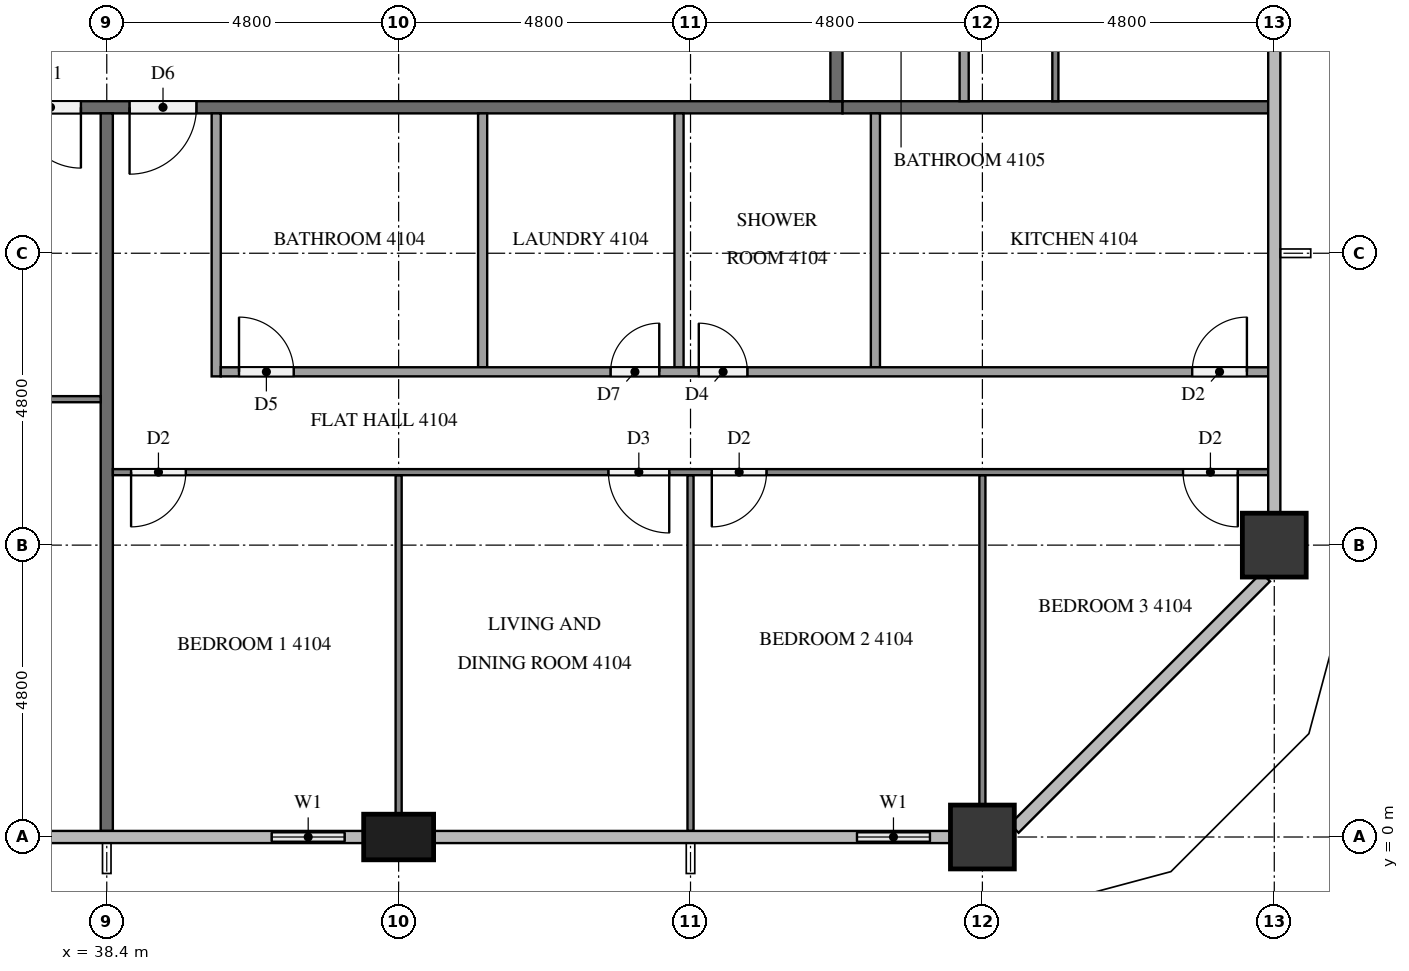
"""IFC4 building model, lengths in metres.
Left out: names, types, materials, properties, quantities, classifications, styles, units other than length and angle.
Written with IfcOpenShell. Run it as: python <this file> out.ifc"""

import sys

from ifc_helpers import new_model, si_unit, direction, frame, frame_2d, origin, origin_2d, place, context, subcontext, project, spatial, rectangle, extrude, element, fill, save


model = new_model("IFC4")
c1 = context("Model", 3, precision=1e-05, world=origin(), true_north=direction((0.0, 1.0)))
c2 = subcontext(c1, "Body", "Model", "MODEL_VIEW")
j1 = project(units=[si_unit("LENGTHUNIT", "METRE"), si_unit("PLANEANGLEUNIT", "RADIAN")], contexts=[c1])
p1 = place(None, origin())
s1 = spatial("IfcSite", under=j1, at=p1, CompositionType="ELEMENT")
p2 = place(p1, origin())
s2 = spatial("IfcBuilding", under=s1, at=p2, CompositionType="ELEMENT")
p3 = place(p2, frame((0.0, 0.0, 159.5)))
s3 = spatial("IfcBuildingStorey", under=s2, at=p3, CompositionType="ELEMENT", Elevation=159.5)
p4 = place(p3, frame((43.2, 0.0, 0.0), z_axis=(0.0, 0.0, 1.0), x_axis=(1.0, 0.0, 0.0)))
e1 = element("IfcColumn", 1, at=p4, inside=s3, PredefinedType="COLUMN", context=c2, shape_type="SweptSolid", body=[
    extrude(rectangle(XDim=1.15, YDim=0.75, at=origin_2d()), origin(), (0.0, 0.0, 1.0), 3.2),
])
for number, where, z_axis, x_axis in (
    (2, (52.8, 0.0, 0.0), (0.0, 0.0, 1.0), (1.0, 0.0, 0.0)),
    (3, (57.6, 4.8, 0.0), (0.0, 0.0, 1.0), (1.0, 0.0, 0.0)),
):
    element("IfcColumn", number, at=place(p3, frame(where, z_axis=z_axis, x_axis=x_axis)), inside=s3, PredefinedType="COLUMN", context=c2, shape_type="SweptSolid", body=[
        extrude(rectangle(XDim=1.05, YDim=1.05, at=origin_2d()), origin(), (0.0, 0.0, 1.0), 3.2),
    ])
p5 = place(p3, frame((40.8, 0.0, 0.0), z_axis=(0.0, 0.0, 1.0), x_axis=(1.0, 0.0, 0.0)))
e4 = element("IfcWall", 4, at=p5, inside=s3, PredefinedType="SOLIDWALL", context=c2, shape_type="SweptSolid", body=[
    extrude(rectangle(XDim=1.825, YDim=0.15, at=frame_2d((0.913, 0.0))), origin(), (0.0, 0.0, 1.0), 3.2),
])
p6 = place(p5, frame((0.312, 0.0, 0.9)))
e5 = element("IfcOpeningElement", 5, at=p6, cuts=e4, PredefinedType="OPENING", context=c2, shape_type="SweptSolid", body=[
    extrude(rectangle(XDim=1.2, YDim=1.4, at=frame_2d((0.6, 0.7))), frame((0.0, 0.085, 0.0), z_axis=(0.0, -1.0, 0.0), x_axis=(1.0, 0.0, 0.0)), (0.0, 0.0, 1.0), 0.17),
])
p7 = place(p3, frame((50.4, 0.0, 0.0), z_axis=(0.0, 0.0, 1.0), x_axis=(1.0, 0.0, 0.0)))
e6 = element("IfcWall", 6, at=p7, inside=s3, PredefinedType="SOLIDWALL", context=c2, shape_type="SweptSolid", body=[
    extrude(rectangle(XDim=1.875, YDim=0.15, at=frame_2d((0.938, 0.0))), origin(), (0.0, 0.0, 1.0), 3.2),
])
p8 = place(p7, frame((0.337, 0.0, 0.9)))
e7 = element("IfcOpeningElement", 7, at=p8, cuts=e6, PredefinedType="OPENING", context=c2, shape_type="SweptSolid", body=[
    extrude(rectangle(XDim=1.2, YDim=1.4, at=frame_2d((0.6, 0.7))), frame((0.0, 0.085, 0.0), z_axis=(0.0, -1.0, 0.0), x_axis=(1.0, 0.0, 0.0)), (0.0, 0.0, 1.0), 0.17),
])
p9 = place(p3, frame((50.5, 12.0, 0.0), z_axis=(0.0, 0.0, 1.0), x_axis=(-1.0, 0.0, 0.0)))
e8 = element("IfcWall", 8, at=p9, inside=s3, PredefinedType="PARTITIONING", context=c2, shape_type="SweptSolid", body=[
    extrude(rectangle(XDim=38.6, YDim=0.2, at=frame_2d((19.3, 0.0))), origin(), (0.0, 0.0, 1.0), 3.2),
])
p10 = place(p9, frame((34.125, 0.0, 0.0)))
e9 = element("IfcOpeningElement", 9, at=p10, cuts=e8, PredefinedType="OPENING", context=c2, shape_type="SweptSolid", body=[
    extrude(rectangle(XDim=1.0, YDim=2.1, at=frame_2d((0.5, 1.05))), frame((0.0, 0.11, 0.0), z_axis=(0.0, -1.0, 0.0), x_axis=(1.0, 0.0, 0.0)), (0.0, 0.0, 1.0), 0.22),
])
p11 = place(p9, frame((32.275, 0.0, 0.0)))
e10 = element("IfcOpeningElement", 10, at=p11, cuts=e8, PredefinedType="OPENING", context=c2, shape_type="SweptSolid", body=[
    extrude(rectangle(XDim=1.0, YDim=2.1, at=frame_2d((0.5, 1.05))), frame((0.0, 0.11, 0.0), z_axis=(0.0, -1.0, 0.0), x_axis=(1.0, 0.0, 0.0)), (0.0, 0.0, 1.0), 0.22),
])
p12 = place(p9, frame((12.525, 0.0, 0.0)))
e11 = element("IfcOpeningElement", 11, at=p12, cuts=e8, PredefinedType="OPENING", context=c2, shape_type="SweptSolid", body=[
    extrude(rectangle(XDim=1.0, YDim=2.1, at=frame_2d((0.5, 1.05))), frame((0.0, 0.11, 0.0), z_axis=(0.0, -1.0, 0.0), x_axis=(1.0, 0.0, 0.0)), (0.0, 0.0, 1.0), 0.22),
])
p13 = place(p9, frame((10.625, 0.0, 0.0)))
e12 = element("IfcOpeningElement", 12, at=p13, cuts=e8, PredefinedType="OPENING", context=c2, shape_type="SweptSolid", body=[
    extrude(rectangle(XDim=1.1, YDim=2.1, at=frame_2d((0.55, 1.05))), frame((0.0, 0.11, 0.0), z_axis=(0.0, -1.0, 0.0), x_axis=(1.0, 0.0, 0.0)), (0.0, 0.0, 1.0), 0.22),
])
p14 = place(p3, frame((50.4, 40.7, 0.0), z_axis=(0.0, 0.0, 1.0), x_axis=(0.0, -1.0, 0.0)))
e13 = element("IfcWall", 13, at=p14, inside=s3, PredefinedType="PARTITIONING", context=c2, shape_type="SweptSolid", body=[
    extrude(rectangle(XDim=28.6, YDim=0.2, at=frame_2d((14.3, 0.0))), origin(), (0.0, 0.0, 1.0), 3.2),
])
p15 = place(p14, frame((19.525, 0.0, 0.0)))
e14 = element("IfcOpeningElement", 14, at=p15, cuts=e13, PredefinedType="OPENING", context=c2, shape_type="SweptSolid", body=[
    extrude(rectangle(XDim=1.0, YDim=2.1, at=frame_2d((0.5, 1.05))), frame((0.0, 0.11, 0.0), z_axis=(0.0, -1.0, 0.0), x_axis=(1.0, 0.0, 0.0)), (0.0, 0.0, 1.0), 0.22),
])
p16 = place(p14, frame((17.675, 0.0, 0.0)))
e15 = element("IfcOpeningElement", 15, at=p16, cuts=e13, PredefinedType="OPENING", context=c2, shape_type="SweptSolid", body=[
    extrude(rectangle(XDim=1.0, YDim=2.1, at=frame_2d((0.5, 1.05))), frame((0.0, 0.11, 0.0), z_axis=(0.0, -1.0, 0.0), x_axis=(1.0, 0.0, 0.0)), (0.0, 0.0, 1.0), 0.22),
])
p17 = place(p14, frame((8.075, 0.0, 0.0)))
e16 = element("IfcOpeningElement", 16, at=p17, cuts=e13, PredefinedType="OPENING", context=c2, shape_type="SweptSolid", body=[
    extrude(rectangle(XDim=1.0, YDim=2.1, at=frame_2d((0.5, 1.05))), frame((0.0, 0.11, 0.0), z_axis=(0.0, -1.0, 0.0), x_axis=(1.0, 0.0, 0.0)), (0.0, 0.0, 1.0), 0.22),
])
p18 = place(p3, frame((38.4, 11.9, 0.0), z_axis=(0.0, 0.0, 1.0), x_axis=(0.0, -1.0, 0.0)))
e17 = element("IfcWall", 17, at=p18, inside=s3, PredefinedType="PARTITIONING", context=c2, shape_type="SweptSolid", body=[
    extrude(rectangle(XDim=11.8, YDim=0.2, at=frame_2d((5.9, 0.0))), origin(), (0.0, 0.0, 1.0), 3.2),
])
p19 = place(p3, frame((50.5, 12.0, 0.0), z_axis=(0.0, 0.0, 1.0), x_axis=(1.0, 0.0, 0.0)))
e18 = element("IfcWall", 18, at=p19, inside=s3, PredefinedType="PARTITIONING", context=c2, shape_type="SweptSolid", body=[
    extrude(rectangle(XDim=7.0, YDim=0.2, at=frame_2d((3.5, 0.0))), origin(), (0.0, 0.0, 1.0), 3.2),
])
p20 = place(p3, frame((38.3, 7.2, 0.0), z_axis=(0.0, 0.0, 1.0), x_axis=(-1.0, 0.0, 0.0)))
e19 = element("IfcWall", 19, at=p20, inside=s3, PredefinedType="PARTITIONING", context=c2, shape_type="SweptSolid", body=[
    extrude(rectangle(XDim=14.2, YDim=0.1, at=frame_2d((7.1, 0.0))), origin(), (0.0, 0.0, 1.0), 3.2),
])
p21 = place(p20, frame((3.45, 0.0, 0.0)))
e20 = element("IfcOpeningElement", 20, at=p21, cuts=e19, PredefinedType="OPENING", context=c2, shape_type="SweptSolid", body=[
    extrude(rectangle(XDim=0.9, YDim=2.1, at=frame_2d((0.45, 1.05))), frame((0.0, 0.06, 0.0), z_axis=(0.0, -1.0, 0.0), x_axis=(1.0, 0.0, 0.0)), (0.0, 0.0, 1.0), 0.12),
])
p22 = place(p20, frame((5.05, 0.0, 0.0)))
e21 = element("IfcOpeningElement", 21, at=p22, cuts=e19, PredefinedType="OPENING", context=c2, shape_type="SweptSolid", body=[
    extrude(rectangle(XDim=0.9, YDim=2.1, at=frame_2d((0.45, 1.05))), frame((0.0, 0.06, 0.0), z_axis=(0.0, -1.0, 0.0), x_axis=(1.0, 0.0, 0.0)), (0.0, 0.0, 1.0), 0.12),
])
p23 = place(p20, frame((12.9, 0.0, 0.0)))
e22 = element("IfcOpeningElement", 22, at=p23, cuts=e19, PredefinedType="OPENING", context=c2, shape_type="SweptSolid", body=[
    extrude(rectangle(XDim=1.0, YDim=2.1, at=frame_2d((0.5, 1.05))), frame((0.0, 0.06, 0.0), z_axis=(0.0, -1.0, 0.0), x_axis=(1.0, 0.0, 0.0)), (0.0, 0.0, 1.0), 0.12),
])
p24 = place(p3, frame((43.2, 5.95, 0.0), z_axis=(0.0, 0.0, 1.0), x_axis=(0.0, -1.0, 0.0)))
e23 = element("IfcWall", 23, at=p24, inside=s3, PredefinedType="PARTITIONING", context=c2, shape_type="SweptSolid", body=[
    extrude(rectangle(XDim=5.575, YDim=0.1, at=frame_2d((2.788, 0.0))), origin(), (0.0, 0.0, 1.0), 3.2),
])
p25 = place(p3, frame((48.0, 5.95, 0.0), z_axis=(0.0, 0.0, 1.0), x_axis=(0.0, -1.0, 0.0)))
e24 = element("IfcWall", 24, at=p25, inside=s3, PredefinedType="PARTITIONING", context=c2, shape_type="SweptSolid", body=[
    extrude(rectangle(XDim=5.85, YDim=0.1, at=frame_2d((2.925, 0.0))), origin(), (0.0, 0.0, 1.0), 3.2),
])
p26 = place(p3, frame((52.8, 5.95, 0.0), z_axis=(0.0, 0.0, 1.0), x_axis=(0.0, -1.0, 0.0)))
e25 = element("IfcWall", 25, at=p26, inside=s3, PredefinedType="PARTITIONING", context=c2, shape_type="SweptSolid", body=[
    extrude(rectangle(XDim=5.425, YDim=0.1, at=frame_2d((2.712, 0.0))), origin(), (0.0, 0.0, 1.0), 3.2),
])
p27 = place(p3, frame((57.5, 6.0, 0.0), z_axis=(0.0, 0.0, 1.0), x_axis=(-1.0, 0.0, 0.0)))
e26 = element("IfcWall", 26, at=p27, inside=s3, PredefinedType="PARTITIONING", context=c2, shape_type="SweptSolid", body=[
    extrude(rectangle(XDim=19.0, YDim=0.1, at=frame_2d((9.5, 0.0))), origin(), (0.0, 0.0, 1.0), 3.2),
])
p28 = place(p27, frame((17.8, 0.0, 0.0)))
e27 = element("IfcOpeningElement", 27, at=p28, cuts=e26, PredefinedType="OPENING", context=c2, shape_type="SweptSolid", body=[
    extrude(rectangle(XDim=0.9, YDim=2.1, at=frame_2d((0.45, 1.05))), frame((0.0, 0.06, 0.0), z_axis=(0.0, -1.0, 0.0), x_axis=(1.0, 0.0, 0.0)), (0.0, 0.0, 1.0), 0.12),
])
p29 = place(p27, frame((9.85, 0.0, 0.0)))
e28 = element("IfcOpeningElement", 28, at=p29, cuts=e26, PredefinedType="OPENING", context=c2, shape_type="SweptSolid", body=[
    extrude(rectangle(XDim=1.0, YDim=2.1, at=frame_2d((0.5, 1.05))), frame((0.0, 0.06, 0.0), z_axis=(0.0, -1.0, 0.0), x_axis=(1.0, 0.0, 0.0)), (0.0, 0.0, 1.0), 0.12),
])
p30 = place(p27, frame((8.25, 0.0, 0.0)))
e29 = element("IfcOpeningElement", 29, at=p30, cuts=e26, PredefinedType="OPENING", context=c2, shape_type="SweptSolid", body=[
    extrude(rectangle(XDim=0.9, YDim=2.1, at=frame_2d((0.45, 1.05))), frame((0.0, 0.06, 0.0), z_axis=(0.0, -1.0, 0.0), x_axis=(1.0, 0.0, 0.0)), (0.0, 0.0, 1.0), 0.12),
])
p31 = place(p27, frame((0.5, 0.0, 0.0)))
e30 = element("IfcOpeningElement", 30, at=p31, cuts=e26, PredefinedType="OPENING", context=c2, shape_type="SweptSolid", body=[
    extrude(rectangle(XDim=0.9, YDim=2.1, at=frame_2d((0.45, 1.05))), frame((0.0, 0.06, 0.0), z_axis=(0.0, -1.0, 0.0), x_axis=(1.0, 0.0, 0.0)), (0.0, 0.0, 1.0), 0.12),
])
for number, where, z_axis, x_axis in (
    (31, (44.581, 11.9, 0.0), (0.0, 0.0, 1.0), (0.0, -1.0, 0.0)),
    (32, (47.811, 11.9, 0.0), (0.0, 0.0, 1.0), (0.0, -1.0, 0.0)),
    (33, (51.041, 11.9, 0.0), (0.0, 0.0, 1.0), (0.0, -1.0, 0.0)),
):
    element("IfcWall", number, at=place(p3, frame(where, z_axis=z_axis, x_axis=x_axis)), inside=s3, PredefinedType="PARTITIONING", context=c2, shape_type="SweptSolid", body=[
        extrude(rectangle(XDim=4.175, YDim=0.15, at=frame_2d((2.087, 0.0))), origin(), (0.0, 0.0, 1.0), 3.2),
    ])
p32 = place(p3, frame((40.2, 11.9, 0.0), z_axis=(0.0, 0.0, 1.0), x_axis=(0.0, -1.0, 0.0)))
e34 = element("IfcWall", 34, at=p32, inside=s3, PredefinedType="PARTITIONING", context=c2, shape_type="SweptSolid", body=[
    extrude(rectangle(XDim=4.325, YDim=0.15, at=frame_2d((2.163, 0.0))), origin(), (0.0, 0.0, 1.0), 3.2),
])
p33 = place(p3, frame((40.275, 7.65, 0.0), z_axis=(0.0, 0.0, 1.0), x_axis=(1.0, 0.0, 0.0)))
e35 = element("IfcWall", 35, at=p33, inside=s3, PredefinedType="PARTITIONING", context=c2, shape_type="SweptSolid", body=[
    extrude(rectangle(XDim=17.225, YDim=0.15, at=frame_2d((8.613, 0.0))), origin(), (0.0, 0.0, 1.0), 3.2),
])
p34 = place(p33, frame((0.3, 0.0, 0.0)))
e36 = element("IfcOpeningElement", 36, at=p34, cuts=e35, PredefinedType="OPENING", context=c2, shape_type="SweptSolid", body=[
    extrude(rectangle(XDim=0.9, YDim=2.1, at=frame_2d((0.45, 1.05))), frame((0.0, 0.085, 0.0), z_axis=(0.0, -1.0, 0.0), x_axis=(1.0, 0.0, 0.0)), (0.0, 0.0, 1.0), 0.17),
])
p35 = place(p33, frame((6.411, 0.0, 0.0)))
e37 = element("IfcOpeningElement", 37, at=p35, cuts=e35, PredefinedType="OPENING", context=c2, shape_type="SweptSolid", body=[
    extrude(rectangle(XDim=0.8, YDim=2.1, at=frame_2d((0.4, 1.05))), frame((0.0, 0.085, 0.0), z_axis=(0.0, -1.0, 0.0), x_axis=(1.0, 0.0, 0.0)), (0.0, 0.0, 1.0), 0.17),
])
p36 = place(p33, frame((7.861, 0.0, 0.0)))
e38 = element("IfcOpeningElement", 38, at=p36, cuts=e35, PredefinedType="OPENING", context=c2, shape_type="SweptSolid", body=[
    extrude(rectangle(XDim=0.8, YDim=2.1, at=frame_2d((0.4, 1.05))), frame((0.0, 0.085, 0.0), z_axis=(0.0, -1.0, 0.0), x_axis=(1.0, 0.0, 0.0)), (0.0, 0.0, 1.0), 0.17),
])
p37 = place(p33, frame((15.975, 0.0, 0.0)))
e39 = element("IfcOpeningElement", 39, at=p37, cuts=e35, PredefinedType="OPENING", context=c2, shape_type="SweptSolid", body=[
    extrude(rectangle(XDim=0.9, YDim=2.1, at=frame_2d((0.45, 1.05))), frame((0.0, 0.085, 0.0), z_axis=(0.0, -1.0, 0.0), x_axis=(1.0, 0.0, 0.0)), (0.0, 0.0, 1.0), 0.17),
])
p38 = place(p3, frame((54.0, 21.5, 0.0), z_axis=(0.0, 0.0, 1.0), x_axis=(0.0, -1.0, 0.0)))
e40 = element("IfcWall", 40, at=p38, inside=s3, PredefinedType="PARTITIONING", context=c2, shape_type="SweptSolid", body=[
    extrude(rectangle(XDim=9.4, YDim=0.1, at=frame_2d((4.7, 0.0))), origin(), (0.0, 0.0, 1.0), 3.2),
])
p39 = place(p38, frame((3.35, 0.0, 0.0)))
e41 = element("IfcOpeningElement", 41, at=p39, cuts=e40, PredefinedType="OPENING", context=c2, shape_type="SweptSolid", body=[
    extrude(rectangle(XDim=1.0, YDim=2.1, at=frame_2d((0.5, 1.05))), frame((0.0, 0.06, 0.0), z_axis=(0.0, -1.0, 0.0), x_axis=(1.0, 0.0, 0.0)), (0.0, 0.0, 1.0), 0.12),
])
p40 = place(p38, frame((5.05, 0.0, 0.0)))
e42 = element("IfcOpeningElement", 42, at=p40, cuts=e40, PredefinedType="OPENING", context=c2, shape_type="SweptSolid", body=[
    extrude(rectangle(XDim=0.9, YDim=2.1, at=frame_2d((0.45, 1.05))), frame((0.0, 0.06, 0.0), z_axis=(0.0, -1.0, 0.0), x_axis=(1.0, 0.0, 0.0)), (0.0, 0.0, 1.0), 0.12),
])
p41 = place(p3, frame((52.5, 12.1, 0.0), z_axis=(0.0, 0.0, 1.0), x_axis=(0.0, 1.0, 0.0)))
e43 = element("IfcWall", 43, at=p41, inside=s3, PredefinedType="PARTITIONING", context=c2, shape_type="SweptSolid", body=[
    extrude(rectangle(XDim=7.625, YDim=0.15, at=frame_2d((3.812, 0.0))), origin(), (0.0, 0.0, 1.0), 3.2),
])
p42 = place(p41, frame((3.375, 0.0, 0.0)))
e44 = element("IfcOpeningElement", 44, at=p42, cuts=e43, PredefinedType="OPENING", context=c2, shape_type="SweptSolid", body=[
    extrude(rectangle(XDim=0.9, YDim=2.1, at=frame_2d((0.45, 1.05))), frame((0.0, 0.085, 0.0), z_axis=(0.0, -1.0, 0.0), x_axis=(1.0, 0.0, 0.0)), (0.0, 0.0, 1.0), 0.17),
])
p43 = place(p41, frame((1.925, 0.0, 0.0)))
e45 = element("IfcOpeningElement", 45, at=p43, cuts=e43, PredefinedType="OPENING", context=c2, shape_type="SweptSolid", body=[
    extrude(rectangle(XDim=0.8, YDim=2.1, at=frame_2d((0.4, 1.05))), frame((0.0, 0.085, 0.0), z_axis=(0.0, -1.0, 0.0), x_axis=(1.0, 0.0, 0.0)), (0.0, 0.0, 1.0), 0.17),
])
p44 = place(p6, origin())
e46 = element("IfcWindow", 46, at=p44, inside=s3, PartitioningType="SINGLE_PANEL", PredefinedType="WINDOW", context=c2, shape_type="SweptSolid", body=[
    extrude(rectangle(XDim=1.2, YDim=1.4, at=frame_2d((0.6, 0.7))), frame((0.0, 0.03, 0.0), z_axis=(0.0, -1.0, 0.0), x_axis=(1.0, 0.0, 0.0)), (0.0, 0.0, 1.0), 0.06),
])
fill(e5, e46)
p45 = place(p8, origin())
e47 = element("IfcWindow", 47, at=p45, inside=s3, PartitioningType="SINGLE_PANEL", PredefinedType="WINDOW", context=c2, shape_type="SweptSolid", body=[
    extrude(rectangle(XDim=1.2, YDim=1.4, at=frame_2d((0.6, 0.7))), frame((0.0, 0.03, 0.0), z_axis=(0.0, -1.0, 0.0), x_axis=(1.0, 0.0, 0.0)), (0.0, 0.0, 1.0), 0.06),
])
fill(e7, e47)
p46 = place(p12, origin())
e48 = element("IfcDoor", 48, at=p46, inside=s3, OperationType="SINGLE_SWING_LEFT", PredefinedType="DOOR", context=c2, shape_type="SweptSolid", body=[
    extrude(rectangle(XDim=1.0, YDim=2.1, at=frame_2d((0.5, 1.05))), frame((0.0, 0.025, 0.0), z_axis=(0.0, -1.0, 0.0), x_axis=(1.0, 0.0, 0.0)), (0.0, 0.0, 1.0), 0.05),
])
fill(e11, e48)
p47 = place(p13, origin())
e49 = element("IfcDoor", 49, at=p47, inside=s3, OperationType="SINGLE_SWING_RIGHT", PredefinedType="DOOR", context=c2, shape_type="SweptSolid", body=[
    extrude(rectangle(XDim=1.1, YDim=2.1, at=frame_2d((0.55, 1.05))), frame((0.0, 0.025, 0.0), z_axis=(0.0, -1.0, 0.0), x_axis=(1.0, 0.0, 0.0)), (0.0, 0.0, 1.0), 0.05),
])
fill(e12, e49)
p48 = place(p28, origin())
e50 = element("IfcDoor", 50, at=p48, inside=s3, OperationType="SINGLE_SWING_RIGHT", PredefinedType="DOOR", context=c2, shape_type="SweptSolid", body=[
    extrude(rectangle(XDim=0.9, YDim=2.1, at=frame_2d((0.45, 1.05))), frame((0.0, 0.025, 0.0), z_axis=(0.0, -1.0, 0.0), x_axis=(1.0, 0.0, 0.0)), (0.0, 0.0, 1.0), 0.05),
])
fill(e27, e50)
p49 = place(p29, origin())
e51 = element("IfcDoor", 51, at=p49, inside=s3, OperationType="SINGLE_SWING_LEFT", PredefinedType="DOOR", context=c2, shape_type="SweptSolid", body=[
    extrude(rectangle(XDim=1.0, YDim=2.1, at=frame_2d((0.5, 1.05))), frame((0.0, 0.025, 0.0), z_axis=(0.0, -1.0, 0.0), x_axis=(1.0, 0.0, 0.0)), (0.0, 0.0, 1.0), 0.05),
])
fill(e28, e51)
p50 = place(p30, origin())
e52 = element("IfcDoor", 52, at=p50, inside=s3, OperationType="SINGLE_SWING_RIGHT", PredefinedType="DOOR", context=c2, shape_type="SweptSolid", body=[
    extrude(rectangle(XDim=0.9, YDim=2.1, at=frame_2d((0.45, 1.05))), frame((0.0, 0.025, 0.0), z_axis=(0.0, -1.0, 0.0), x_axis=(1.0, 0.0, 0.0)), (0.0, 0.0, 1.0), 0.05),
])
fill(e29, e52)
p51 = place(p31, origin())
e53 = element("IfcDoor", 53, at=p51, inside=s3, OperationType="SINGLE_SWING_LEFT", PredefinedType="DOOR", context=c2, shape_type="SweptSolid", body=[
    extrude(rectangle(XDim=0.9, YDim=2.1, at=frame_2d((0.45, 1.05))), frame((0.0, 0.025, 0.0), z_axis=(0.0, -1.0, 0.0), x_axis=(1.0, 0.0, 0.0)), (0.0, 0.0, 1.0), 0.05),
])
fill(e30, e53)
p52 = place(p34, origin())
e54 = element("IfcDoor", 54, at=p52, inside=s3, OperationType="SINGLE_SWING_LEFT", PredefinedType="DOOR", context=c2, shape_type="SweptSolid", body=[
    extrude(rectangle(XDim=0.9, YDim=2.1, at=frame_2d((0.45, 1.05))), frame((0.0, 0.025, 0.0), z_axis=(0.0, -1.0, 0.0), x_axis=(1.0, 0.0, 0.0)), (0.0, 0.0, 1.0), 0.05),
])
fill(e36, e54)
p53 = place(p35, origin())
e55 = element("IfcDoor", 55, at=p53, inside=s3, OperationType="SINGLE_SWING_RIGHT", PredefinedType="DOOR", context=c2, shape_type="SweptSolid", body=[
    extrude(rectangle(XDim=0.8, YDim=2.1, at=frame_2d((0.4, 1.05))), frame((0.0, 0.025, 0.0), z_axis=(0.0, -1.0, 0.0), x_axis=(1.0, 0.0, 0.0)), (0.0, 0.0, 1.0), 0.05),
])
fill(e37, e55)
p54 = place(p36, origin())
e56 = element("IfcDoor", 56, at=p54, inside=s3, OperationType="SINGLE_SWING_LEFT", PredefinedType="DOOR", context=c2, shape_type="SweptSolid", body=[
    extrude(rectangle(XDim=0.8, YDim=2.1, at=frame_2d((0.4, 1.05))), frame((0.0, 0.025, 0.0), z_axis=(0.0, -1.0, 0.0), x_axis=(1.0, 0.0, 0.0)), (0.0, 0.0, 1.0), 0.05),
])
fill(e38, e56)
p55 = place(p37, origin())
e57 = element("IfcDoor", 57, at=p55, inside=s3, OperationType="SINGLE_SWING_RIGHT", PredefinedType="DOOR", context=c2, shape_type="SweptSolid", body=[
    extrude(rectangle(XDim=0.9, YDim=2.1, at=frame_2d((0.45, 1.05))), frame((0.0, 0.025, 0.0), z_axis=(0.0, -1.0, 0.0), x_axis=(1.0, 0.0, 0.0)), (0.0, 0.0, 1.0), 0.05),
])
fill(e39, e57)
save(model, sys.argv[1])
